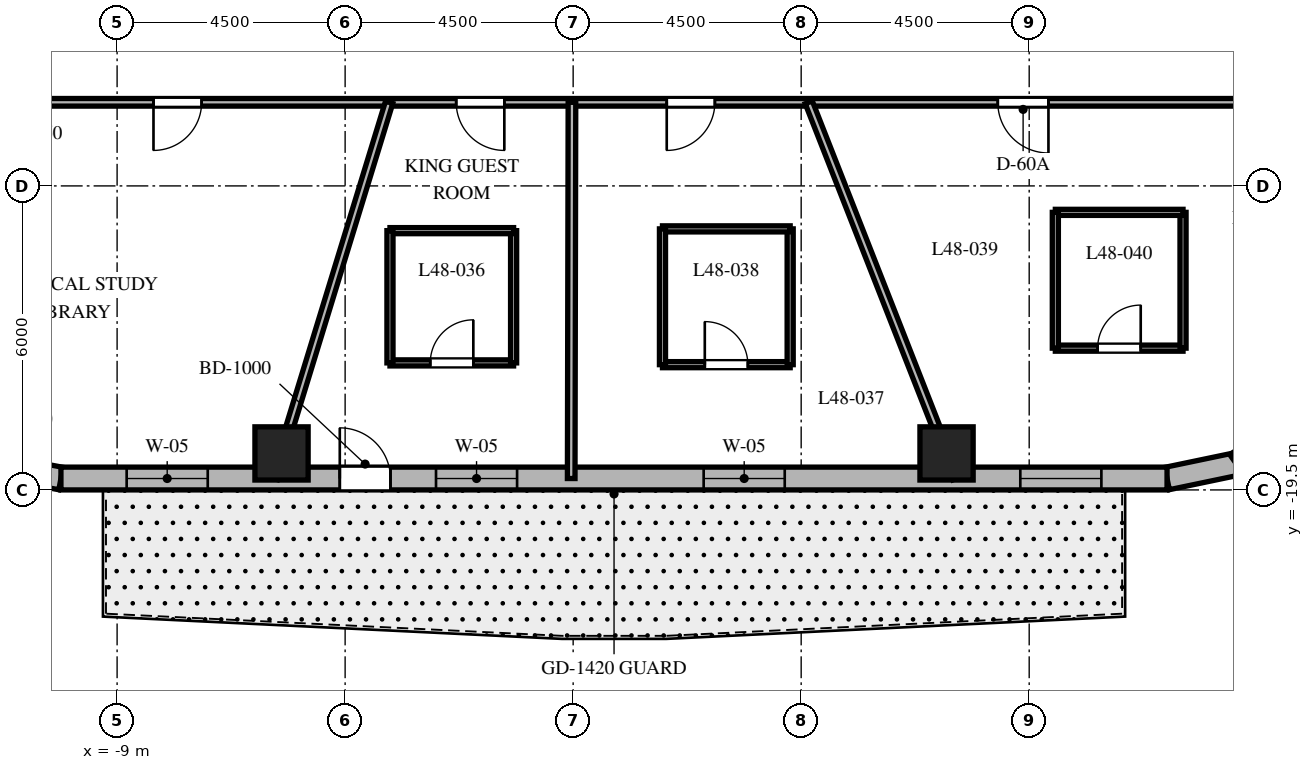
"""IFC4 building model, lengths in metres.
Left out: names, types, materials, properties, quantities, classifications, styles, units other than length and angle.
Written with IfcOpenShell. Run it as: python <this file> out.ifc"""

import sys

from ifc_helpers import new_model, si_unit, direction, frame, frame_2d, origin, origin_2d, place, context, subcontext, project, spatial, rectangle, extrude, element, fill, save


model = new_model("IFC4")
c1 = context("Model", 3, precision=1e-05, world=origin(), true_north=direction((0.0, 1.0)))
c2 = subcontext(c1, "Body", "Model", "MODEL_VIEW")
j1 = project(units=[si_unit("LENGTHUNIT", "METRE"), si_unit("PLANEANGLEUNIT", "RADIAN")], contexts=[c1])
p1 = place(None, origin())
s1 = spatial("IfcSite", under=j1, at=p1, CompositionType="ELEMENT")
p2 = place(p1, origin())
s2 = spatial("IfcBuilding", under=s1, at=p2, CompositionType="ELEMENT")
p3 = place(p2, frame((0.0, 0.0, 194.1)))
s3 = spatial("IfcBuildingStorey", under=s2, at=p3, CompositionType="ELEMENT", Elevation=194.1)
for number, where, z_axis, x_axis in (
    (1, (-5.755, -18.78, 0.0), (0.0, 0.0, 1.0), (1.0, 0.0, 0.0)),
    (2, (7.369, -18.78, 0.0), (0.0, 0.0, 1.0), (1.0, 0.0, 0.0)),
):
    element("IfcColumn", number, at=place(p3, frame(where, z_axis=z_axis, x_axis=x_axis)), inside=s3, PredefinedType="COLUMN", context=c2, shape_type="SweptSolid", body=[
        extrude(rectangle(XDim=1.05, YDim=1.05, at=origin_2d()), origin(), (0.0, 0.0, 1.0), 3.7),
    ])
p4 = place(p3, frame((-11.349, -19.043, 0.0), z_axis=(0.0, 0.0, 1.0), x_axis=(0.982931267051, -0.183973161772, 0.0)))
e3 = element("IfcWall", 3, at=p4, inside=s3, PredefinedType="SOLIDWALL", context=c2, shape_type="SweptSolid", body=[
    extrude(rectangle(XDim=1.262, YDim=0.45, at=frame_2d((0.631, 0.0))), origin(), (0.0, 0.0, 1.0), 3.4),
])
p5 = place(p3, frame((11.72, -19.275, 0.0), z_axis=(0.0, 0.0, 1.0), x_axis=(0.97893106758, 0.204191001093, 0.0)))
e4 = element("IfcWall", 4, at=p5, inside=s3, PredefinedType="SOLIDWALL", context=c2, shape_type="SweptSolid", body=[
    extrude(rectangle(XDim=1.4, YDim=0.45, at=frame_2d((0.7, 0.0))), origin(), (0.0, 0.0, 1.0), 3.4),
])
p6 = place(p3, frame((13.091, -18.989, 0.0), z_axis=(0.0, 0.0, 1.0), x_axis=(0.815574637848, 0.578651890258, 0.0)))
e5 = element("IfcWall", 5, at=p6, inside=s3, PredefinedType="SOLIDWALL", context=c2, shape_type="SweptSolid", body=[
    extrude(rectangle(XDim=1.377, YDim=0.45, at=frame_2d((0.688, 0.0))), origin(), (0.0, 0.0, 1.0), 3.4),
])
p7 = place(p3, frame((-10.108, -19.275, 0.0), z_axis=(0.0, 0.0, 1.0), x_axis=(1.0, 0.0, 0.0)))
e6 = element("IfcWall", 6, at=p7, inside=s3, PredefinedType="SOLIDWALL", context=c2, shape_type="SweptSolid", body=[
    extrude(rectangle(XDim=21.829, YDim=0.45, at=frame_2d((10.915, 0.0))), origin(), (0.0, 0.0, 1.0), 3.4),
])
p8 = place(p7, frame((5.503, 0.0, 0.0)))
e7 = element("IfcOpeningElement", 7, at=p8, cuts=e6, PredefinedType="OPENING", context=c2, shape_type="SweptSolid", body=[
    extrude(rectangle(XDim=1.0, YDim=2.15, at=frame_2d((0.5, 1.075))), frame((0.0, 0.235, 0.0), z_axis=(0.0, -1.0, 0.0), x_axis=(1.0, 0.0, 0.0)), (0.0, 0.0, 1.0), 0.47),
])
p9 = place(p7, frame((1.297, 0.0, 0.8)))
e8 = element("IfcOpeningElement", 8, at=p9, cuts=e6, PredefinedType="OPENING", context=c2, shape_type="SweptSolid", body=[
    extrude(rectangle(XDim=1.6, YDim=1.75, at=frame_2d((0.8, 0.875))), frame((0.0, 0.235, 0.0), z_axis=(0.0, -1.0, 0.0), x_axis=(1.0, 0.0, 0.0)), (0.0, 0.0, 1.0), 0.47),
])
p10 = place(p7, frame((7.402, 0.0, 0.8)))
e9 = element("IfcOpeningElement", 9, at=p10, cuts=e6, PredefinedType="OPENING", context=c2, shape_type="SweptSolid", body=[
    extrude(rectangle(XDim=1.6, YDim=1.75, at=frame_2d((0.8, 0.875))), frame((0.0, 0.235, 0.0), z_axis=(0.0, -1.0, 0.0), x_axis=(1.0, 0.0, 0.0)), (0.0, 0.0, 1.0), 0.47),
])
p11 = place(p7, frame((12.684, 0.0, 0.8)))
e10 = element("IfcOpeningElement", 10, at=p11, cuts=e6, PredefinedType="OPENING", context=c2, shape_type="SweptSolid", body=[
    extrude(rectangle(XDim=1.6, YDim=1.75, at=frame_2d((0.8, 0.875))), frame((0.0, 0.235, 0.0), z_axis=(0.0, -1.0, 0.0), x_axis=(1.0, 0.0, 0.0)), (0.0, 0.0, 1.0), 0.47),
])
p12 = place(p7, frame((18.933, 0.0, 0.8)))
e11 = element("IfcOpeningElement", 11, at=p12, cuts=e6, PredefinedType="OPENING", context=c2, shape_type="SweptSolid", body=[
    extrude(rectangle(XDim=1.6, YDim=1.75, at=frame_2d((0.8, 0.875))), frame((0.0, 0.235, 0.0), z_axis=(0.0, -1.0, 0.0), x_axis=(1.0, 0.0, 0.0)), (0.0, 0.0, 1.0), 0.47),
])
p13 = place(p3, frame((13.35, -11.85, 0.0), z_axis=(0.0, 0.0, 1.0), x_axis=(-1.0, 0.0, 0.0)))
e12 = element("IfcWall", 12, at=p13, inside=s3, PredefinedType="PARTITIONING", context=c2, shape_type="SweptSolid", body=[
    extrude(rectangle(XDim=26.7, YDim=0.15, at=frame_2d((13.35, 0.0))), origin(), (0.0, 0.0, 1.0), 2.84),
])
p14 = place(p13, frame((20.682, 0.0, 0.0)))
e13 = element("IfcOpeningElement", 13, at=p14, cuts=e12, PredefinedType="OPENING", context=c2, shape_type="SweptSolid", body=[
    extrude(rectangle(XDim=0.95, YDim=2.03, at=frame_2d((0.475, 1.015))), frame((0.0, 0.085, 0.0), z_axis=(0.0, -1.0, 0.0), x_axis=(1.0, 0.0, 0.0)), (0.0, 0.0, 1.0), 0.17),
])
p15 = place(p13, frame((14.708, 0.0, 0.0)))
e14 = element("IfcOpeningElement", 14, at=p15, cuts=e12, PredefinedType="OPENING", context=c2, shape_type="SweptSolid", body=[
    extrude(rectangle(XDim=0.95, YDim=2.03, at=frame_2d((0.475, 1.015))), frame((0.0, 0.085, 0.0), z_axis=(0.0, -1.0, 0.0), x_axis=(1.0, 0.0, 0.0)), (0.0, 0.0, 1.0), 0.17),
])
p16 = place(p13, frame((10.553, 0.0, 0.0)))
e15 = element("IfcOpeningElement", 15, at=p16, cuts=e12, PredefinedType="OPENING", context=c2, shape_type="SweptSolid", body=[
    extrude(rectangle(XDim=0.95, YDim=2.03, at=frame_2d((0.475, 1.015))), frame((0.0, 0.085, 0.0), z_axis=(0.0, -1.0, 0.0), x_axis=(1.0, 0.0, 0.0)), (0.0, 0.0, 1.0), 0.17),
])
p17 = place(p13, frame((3.97, 0.0, 0.0)))
e16 = element("IfcOpeningElement", 16, at=p17, cuts=e12, PredefinedType="OPENING", context=c2, shape_type="SweptSolid", body=[
    extrude(rectangle(XDim=1.0, YDim=2.03, at=frame_2d((0.5, 1.015))), frame((0.0, 0.085, 0.0), z_axis=(0.0, -1.0, 0.0), x_axis=(1.0, 0.0, 0.0)), (0.0, 0.0, 1.0), 0.17),
])
p18 = place(p3, frame((-3.631, -11.85, 0.0), z_axis=(0.0, 0.0, 1.0), x_axis=(-0.293007573338, -0.956110120209, 0.0)))
e17 = element("IfcWall", 17, at=p18, inside=s3, PredefinedType="PARTITIONING", context=c2, shape_type="SweptSolid", body=[
    extrude(rectangle(XDim=7.766, YDim=0.15, at=frame_2d((3.883, 0.0))), origin(), (0.0, 0.0, 1.0), 2.64),
])
p19 = place(p3, frame((-0.024, -11.85, 0.0), z_axis=(0.0, 0.0, 1.0), x_axis=(-0.001972901592, -0.999998053828, 0.0)))
e18 = element("IfcWall", 18, at=p19, inside=s3, PredefinedType="PARTITIONING", context=c2, shape_type="SweptSolid", body=[
    extrude(rectangle(XDim=7.425, YDim=0.15, at=frame_2d((3.712, 0.0))), origin(), (0.0, 0.0, 1.0), 2.64),
])
p20 = place(p3, frame((4.65, -11.85, 0.0), z_axis=(0.0, 0.0, 1.0), x_axis=(0.365265947993, -0.930903210456, 0.0)))
e19 = element("IfcWall", 19, at=p20, inside=s3, PredefinedType="PARTITIONING", context=c2, shape_type="SweptSolid", body=[
    extrude(rectangle(XDim=7.976, YDim=0.15, at=frame_2d((3.988, 0.0))), origin(), (0.0, 0.0, 1.0), 2.64),
])
p21 = place(p3, frame((-3.615, -16.993, 0.0), z_axis=(0.0, 0.0, 1.0), x_axis=(1.0, 0.0, 0.0)))
e20 = element("IfcWall", 20, at=p21, inside=s3, PredefinedType="PARTITIONING", context=c2, shape_type="SweptSolid", body=[
    extrude(rectangle(XDim=2.44, YDim=0.12, at=frame_2d((1.22, 0.0))), origin(), (0.0, 0.0, 1.0), 3.4),
])
p22 = place(p21, frame((0.795, 0.0, 0.0)))
e21 = element("IfcOpeningElement", 21, at=p22, cuts=e20, PredefinedType="OPENING", context=c2, shape_type="SweptSolid", body=[
    extrude(rectangle(XDim=0.85, YDim=2.03, at=frame_2d((0.425, 1.015))), frame((0.0, 0.07, 0.0), z_axis=(0.0, -1.0, 0.0), x_axis=(1.0, 0.0, 0.0)), (0.0, 0.0, 1.0), 0.14),
])
p23 = place(p3, frame((-1.175, -16.993, 0.0), z_axis=(0.0, 0.0, 1.0), x_axis=(0.0, 1.0, 0.0)))
e22 = element("IfcWall", 22, at=p23, inside=s3, PredefinedType="PARTITIONING", context=c2, shape_type="SweptSolid", body=[
    extrude(rectangle(XDim=2.61, YDim=0.12, at=frame_2d((1.305, 0.0))), origin(), (0.0, 0.0, 1.0), 2.84),
])
p24 = place(p3, frame((-1.175, -14.383, 0.0), z_axis=(0.0, 0.0, 1.0), x_axis=(-1.0, 0.0, 0.0)))
e23 = element("IfcWall", 23, at=p24, inside=s3, PredefinedType="PARTITIONING", context=c2, shape_type="SweptSolid", body=[
    extrude(rectangle(XDim=2.44, YDim=0.12, at=frame_2d((1.22, 0.0))), origin(), (0.0, 0.0, 1.0), 3.4),
])
p25 = place(p3, frame((-3.615, -14.383, 0.0), z_axis=(0.0, 0.0, 1.0), x_axis=(0.0, -1.0, 0.0)))
e24 = element("IfcWall", 24, at=p25, inside=s3, PredefinedType="PARTITIONING", context=c2, shape_type="SweptSolid", body=[
    extrude(rectangle(XDim=2.61, YDim=0.12, at=frame_2d((1.305, 0.0))), origin(), (0.0, 0.0, 1.0), 2.84),
])
p26 = place(p3, frame((1.763, -17.028, 0.0), z_axis=(0.0, 0.0, 1.0), x_axis=(1.0, 0.0, 0.0)))
e25 = element("IfcWall", 25, at=p26, inside=s3, PredefinedType="PARTITIONING", context=c2, shape_type="SweptSolid", body=[
    extrude(rectangle(XDim=2.52, YDim=0.12, at=frame_2d((1.26, 0.0))), origin(), (0.0, 0.0, 1.0), 3.4),
])
p27 = place(p26, frame((0.835, 0.0, 0.0)))
e26 = element("IfcOpeningElement", 26, at=p27, cuts=e25, PredefinedType="OPENING", context=c2, shape_type="SweptSolid", body=[
    extrude(rectangle(XDim=0.85, YDim=2.03, at=frame_2d((0.425, 1.015))), frame((0.0, 0.07, 0.0), z_axis=(0.0, -1.0, 0.0), x_axis=(1.0, 0.0, 0.0)), (0.0, 0.0, 1.0), 0.14),
])
p28 = place(p3, frame((4.283, -17.028, 0.0), z_axis=(0.0, 0.0, 1.0), x_axis=(0.0, 1.0, 0.0)))
e27 = element("IfcWall", 27, at=p28, inside=s3, PredefinedType="PARTITIONING", context=c2, shape_type="SweptSolid", body=[
    extrude(rectangle(XDim=2.68, YDim=0.12, at=frame_2d((1.34, 0.0))), origin(), (0.0, 0.0, 1.0), 2.84),
])
p29 = place(p3, frame((4.283, -14.348, 0.0), z_axis=(0.0, 0.0, 1.0), x_axis=(-1.0, 0.0, 0.0)))
e28 = element("IfcWall", 28, at=p29, inside=s3, PredefinedType="PARTITIONING", context=c2, shape_type="SweptSolid", body=[
    extrude(rectangle(XDim=2.52, YDim=0.12, at=frame_2d((1.26, 0.0))), origin(), (0.0, 0.0, 1.0), 3.4),
])
p30 = place(p3, frame((1.763, -14.348, 0.0), z_axis=(0.0, 0.0, 1.0), x_axis=(0.0, -1.0, 0.0)))
e29 = element("IfcWall", 29, at=p30, inside=s3, PredefinedType="PARTITIONING", context=c2, shape_type="SweptSolid", body=[
    extrude(rectangle(XDim=2.68, YDim=0.12, at=frame_2d((1.34, 0.0))), origin(), (0.0, 0.0, 1.0), 2.84),
])
p31 = place(p3, frame((9.516, -16.702, 0.0), z_axis=(0.0, 0.0, 1.0), x_axis=(1.0, 0.0, 0.0)))
e30 = element("IfcWall", 30, at=p31, inside=s3, PredefinedType="PARTITIONING", context=c2, shape_type="SweptSolid", body=[
    extrude(rectangle(XDim=2.52, YDim=0.12, at=frame_2d((1.26, 0.0))), origin(), (0.0, 0.0, 1.0), 2.64),
])
p32 = place(p31, frame((0.835, 0.0, 0.0)))
e31 = element("IfcOpeningElement", 31, at=p32, cuts=e30, PredefinedType="OPENING", context=c2, shape_type="SweptSolid", body=[
    extrude(rectangle(XDim=0.85, YDim=2.03, at=frame_2d((0.425, 1.015))), frame((0.0, 0.07, 0.0), z_axis=(0.0, -1.0, 0.0), x_axis=(1.0, 0.0, 0.0)), (0.0, 0.0, 1.0), 0.14),
])
p33 = place(p3, frame((12.036, -16.702, 0.0), z_axis=(0.0, 0.0, 1.0), x_axis=(0.0, 1.0, 0.0)))
e32 = element("IfcWall", 32, at=p33, inside=s3, PredefinedType="PARTITIONING", context=c2, shape_type="SweptSolid", body=[
    extrude(rectangle(XDim=2.68, YDim=0.12, at=frame_2d((1.34, 0.0))), origin(), (0.0, 0.0, 1.0), 2.64),
])
p34 = place(p3, frame((12.036, -14.022, 0.0), z_axis=(0.0, 0.0, 1.0), x_axis=(-1.0, 0.0, 0.0)))
e33 = element("IfcWall", 33, at=p34, inside=s3, PredefinedType="PARTITIONING", context=c2, shape_type="SweptSolid", body=[
    extrude(rectangle(XDim=2.52, YDim=0.12, at=frame_2d((1.26, 0.0))), origin(), (0.0, 0.0, 1.0), 2.927),
])
p35 = place(p3, frame((9.516, -14.022, 0.0), z_axis=(0.0, 0.0, 1.0), x_axis=(0.0, -1.0, 0.0)))
e34 = element("IfcWall", 34, at=p35, inside=s3, PredefinedType="PARTITIONING", context=c2, shape_type="SweptSolid", body=[
    extrude(rectangle(XDim=2.68, YDim=0.12, at=frame_2d((1.34, 0.0))), origin(), (0.0, 0.0, 1.0), 2.927),
])
p36 = place(p8, origin())
e35 = element("IfcDoor", 35, at=p36, inside=s3, OperationType="SINGLE_SWING_LEFT", PredefinedType="DOOR", context=c2, shape_type="SweptSolid", body=[
    extrude(rectangle(XDim=1.0, YDim=2.15, at=frame_2d((0.5, 1.075))), frame((0.0, 0.025, 0.0), z_axis=(0.0, -1.0, 0.0), x_axis=(1.0, 0.0, 0.0)), (0.0, 0.0, 1.0), 0.05),
])
fill(e7, e35)
p37 = place(p9, origin())
e36 = element("IfcWindow", 36, at=p37, inside=s3, PartitioningType="SINGLE_PANEL", PredefinedType="WINDOW", context=c2, shape_type="SweptSolid", body=[
    extrude(rectangle(XDim=1.6, YDim=1.75, at=frame_2d((0.8, 0.875))), frame((0.0, 0.03, 0.0), z_axis=(0.0, -1.0, 0.0), x_axis=(1.0, 0.0, 0.0)), (0.0, 0.0, 1.0), 0.06),
])
fill(e8, e36)
p38 = place(p10, origin())
e37 = element("IfcWindow", 37, at=p38, inside=s3, PartitioningType="SINGLE_PANEL", PredefinedType="WINDOW", context=c2, shape_type="SweptSolid", body=[
    extrude(rectangle(XDim=1.6, YDim=1.75, at=frame_2d((0.8, 0.875))), frame((0.0, 0.03, 0.0), z_axis=(0.0, -1.0, 0.0), x_axis=(1.0, 0.0, 0.0)), (0.0, 0.0, 1.0), 0.06),
])
fill(e9, e37)
p39 = place(p11, origin())
e38 = element("IfcWindow", 38, at=p39, inside=s3, PartitioningType="SINGLE_PANEL", PredefinedType="WINDOW", context=c2, shape_type="SweptSolid", body=[
    extrude(rectangle(XDim=1.6, YDim=1.75, at=frame_2d((0.8, 0.875))), frame((0.0, 0.03, 0.0), z_axis=(0.0, -1.0, 0.0), x_axis=(1.0, 0.0, 0.0)), (0.0, 0.0, 1.0), 0.06),
])
fill(e10, e38)
p40 = place(p12, origin())
e39 = element("IfcWindow", 39, at=p40, inside=s3, PartitioningType="SINGLE_PANEL", PredefinedType="WINDOW", context=c2, shape_type="SweptSolid", body=[
    extrude(rectangle(XDim=1.6, YDim=1.75, at=frame_2d((0.8, 0.875))), frame((0.0, 0.03, 0.0), z_axis=(0.0, -1.0, 0.0), x_axis=(1.0, 0.0, 0.0)), (0.0, 0.0, 1.0), 0.06),
])
fill(e11, e39)
p41 = place(p14, origin())
e40 = element("IfcDoor", 40, at=p41, inside=s3, OperationType="SINGLE_SWING_RIGHT", PredefinedType="DOOR", context=c2, shape_type="SweptSolid", body=[
    extrude(rectangle(XDim=0.95, YDim=2.03, at=frame_2d((0.475, 1.015))), frame((0.0, 0.025, 0.0), z_axis=(0.0, -1.0, 0.0), x_axis=(1.0, 0.0, 0.0)), (0.0, 0.0, 1.0), 0.05),
])
fill(e13, e40)
p42 = place(p15, origin())
e41 = element("IfcDoor", 41, at=p42, inside=s3, OperationType="SINGLE_SWING_LEFT", PredefinedType="DOOR", context=c2, shape_type="SweptSolid", body=[
    extrude(rectangle(XDim=0.95, YDim=2.03, at=frame_2d((0.475, 1.015))), frame((0.0, 0.025, 0.0), z_axis=(0.0, -1.0, 0.0), x_axis=(1.0, 0.0, 0.0)), (0.0, 0.0, 1.0), 0.05),
])
fill(e14, e41)
p43 = place(p22, origin())
e42 = element("IfcDoor", 42, at=p43, inside=s3, OperationType="SINGLE_SWING_RIGHT", PredefinedType="DOOR", context=c2, shape_type="SweptSolid", body=[
    extrude(rectangle(XDim=0.85, YDim=2.03, at=frame_2d((0.425, 1.015))), frame((0.0, 0.025, 0.0), z_axis=(0.0, -1.0, 0.0), x_axis=(1.0, 0.0, 0.0)), (0.0, 0.0, 1.0), 0.05),
])
fill(e21, e42)
p44 = place(p16, origin())
e43 = element("IfcDoor", 43, at=p44, inside=s3, OperationType="SINGLE_SWING_RIGHT", PredefinedType="DOOR", context=c2, shape_type="SweptSolid", body=[
    extrude(rectangle(XDim=0.95, YDim=2.03, at=frame_2d((0.475, 1.015))), frame((0.0, 0.025, 0.0), z_axis=(0.0, -1.0, 0.0), x_axis=(1.0, 0.0, 0.0)), (0.0, 0.0, 1.0), 0.05),
])
fill(e15, e43)
p45 = place(p27, origin())
e44 = element("IfcDoor", 44, at=p45, inside=s3, OperationType="SINGLE_SWING_LEFT", PredefinedType="DOOR", context=c2, shape_type="SweptSolid", body=[
    extrude(rectangle(XDim=0.85, YDim=2.03, at=frame_2d((0.425, 1.015))), frame((0.0, 0.025, 0.0), z_axis=(0.0, -1.0, 0.0), x_axis=(1.0, 0.0, 0.0)), (0.0, 0.0, 1.0), 0.05),
])
fill(e26, e44)
p46 = place(p17, origin())
e45 = element("IfcDoor", 45, at=p46, inside=s3, OperationType="SINGLE_SWING_LEFT", PredefinedType="DOOR", context=c2, shape_type="SweptSolid", body=[
    extrude(rectangle(XDim=1.0, YDim=2.03, at=frame_2d((0.5, 1.015))), frame((0.0, 0.025, 0.0), z_axis=(0.0, -1.0, 0.0), x_axis=(1.0, 0.0, 0.0)), (0.0, 0.0, 1.0), 0.05),
])
fill(e16, e45)
p47 = place(p32, origin())
e46 = element("IfcDoor", 46, at=p47, inside=s3, OperationType="SINGLE_SWING_RIGHT", PredefinedType="DOOR", context=c2, shape_type="SweptSolid", body=[
    extrude(rectangle(XDim=0.85, YDim=2.03, at=frame_2d((0.425, 1.015))), frame((0.0, 0.025, 0.0), z_axis=(0.0, -1.0, 0.0), x_axis=(1.0, 0.0, 0.0)), (0.0, 0.0, 1.0), 0.05),
])
fill(e31, e46)
save(model, sys.argv[1])
